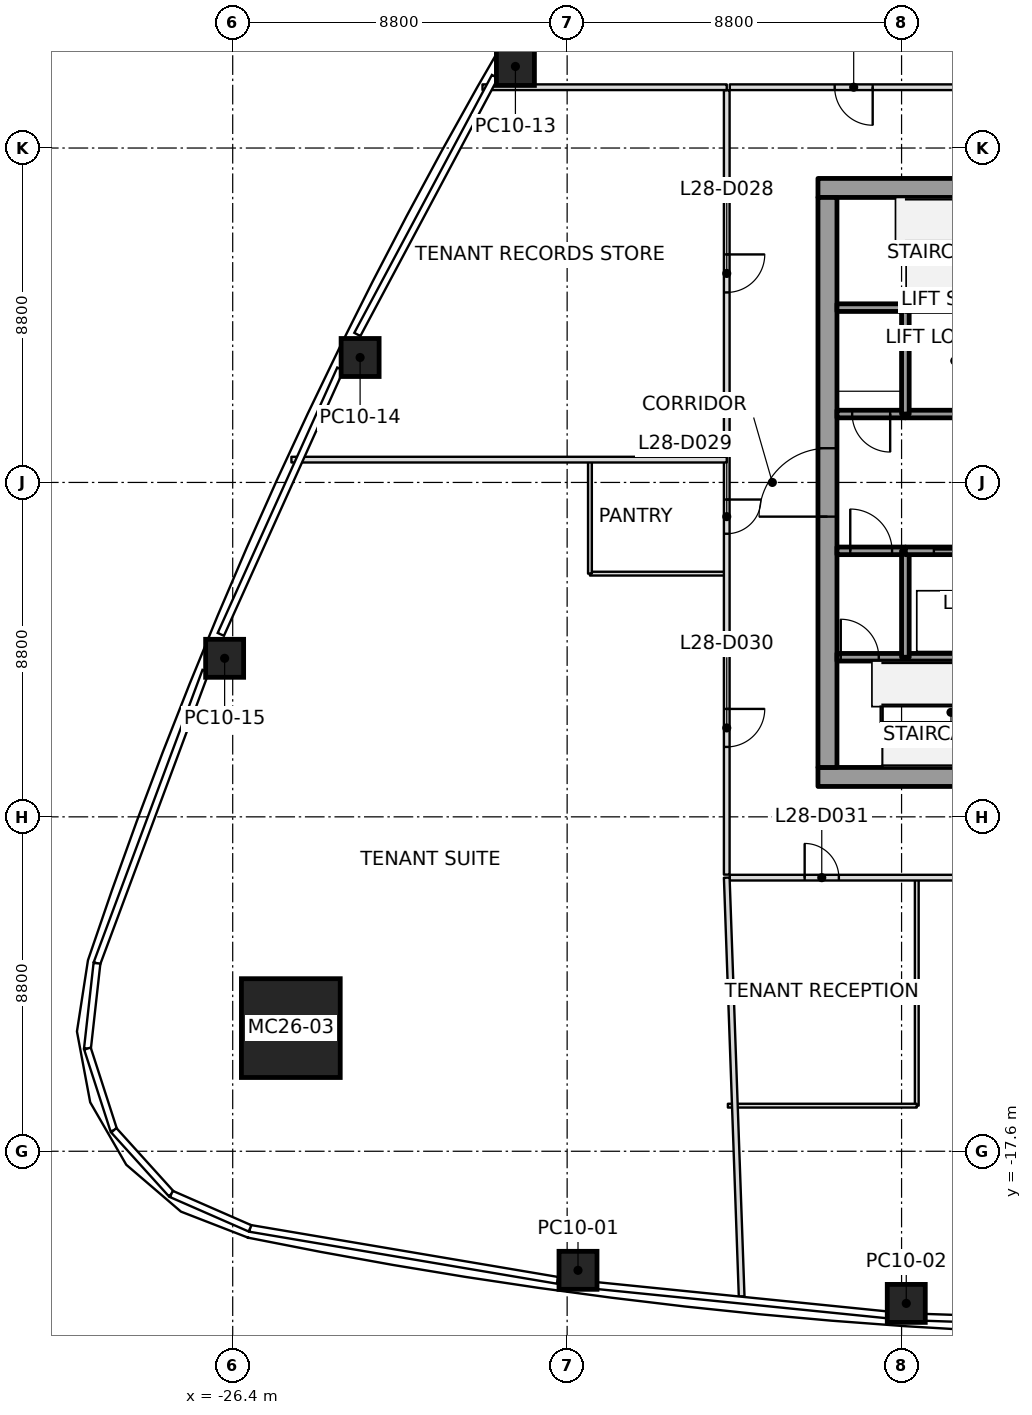
"""IFC4 building model, lengths in metres.
Left out: names, types, materials, properties, quantities, classifications, styles, units other than length and angle.
Written with IfcOpenShell. Run it as: python <this file> out.ifc"""

import sys

from ifc_helpers import new_model, si_unit, direction, frame, frame_2d, origin, origin_2d, place, context, subcontext, project, spatial, rectangle, extrude, element, fill, save


model = new_model("IFC4")
c1 = context("Model", 3, precision=1e-05, world=origin(), true_north=direction((0.0, 1.0)))
c2 = subcontext(c1, "Body", "Model", "MODEL_VIEW")
j1 = project(units=[si_unit("LENGTHUNIT", "METRE"), si_unit("PLANEANGLEUNIT", "RADIAN")], contexts=[c1])
p1 = place(None, origin())
s1 = spatial("IfcSite", under=j1, at=p1, CompositionType="ELEMENT")
p2 = place(p1, origin())
s2 = spatial("IfcBuilding", under=s1, at=p2, CompositionType="ELEMENT")
p3 = place(p2, frame((0.0, 0.0, 133.8)))
s3 = spatial("IfcBuildingStorey", under=s2, at=p3, CompositionType="ELEMENT", Elevation=133.8)
p4 = place(p3, frame((-24.871, -14.359, 0.0), z_axis=(0.028122372328, 0.016226791842, 0.999472772716), x_axis=(0.999604487872, -0.00045651644, -0.02811866672)))
e1 = element("IfcColumn", 1, at=p4, inside=s3, PredefinedType="COLUMN", context=c2, shape_type="SweptSolid", body=[
    extrude(rectangle(XDim=2.6, YDim=2.6, at=origin_2d()), origin(), (0.0, 0.0, 1.0), 4.002),
])
p5 = place(p3, frame((-17.314, -20.733, 0.0), z_axis=(0.017696448434, 0.010495824588, 0.999788314284), x_axis=(-0.990889638844, 0.133706305787, 0.016135285075)))
e2 = element("IfcColumn", 2, at=p5, inside=s3, PredefinedType="COLUMN", context=c2, shape_type="SweptSolid", body=[
    extrude(rectangle(XDim=1.0, YDim=1.0, at=origin_2d()), origin(), (0.0, 0.0, 1.0), 4.001),
])
p6 = place(p3, frame((-8.677, -21.604, 0.0), z_axis=(0.008849193104, 0.011229320904, 0.999897791843), x_axis=(-0.99771962889, 0.067009688007, 0.008077365942)))
e3 = element("IfcColumn", 3, at=p6, inside=s3, PredefinedType="COLUMN", context=c2, shape_type="SweptSolid", body=[
    extrude(rectangle(XDim=1.0, YDim=1.0, at=origin_2d()), origin(), (0.0, 0.0, 1.0), 4.0),
])
p7 = place(p3, frame((-18.961, 10.947, 0.0), z_axis=(0.009887052741, -0.005675900648, 0.999935013058), x_axis=(0.49997556095, 0.866039512773, -2.7732311e-05)))
e4 = element("IfcColumn", 4, at=p7, inside=s3, PredefinedType="COLUMN", context=c2, shape_type="SweptSolid", body=[
    extrude(rectangle(XDim=1.0, YDim=1.0, at=origin_2d()), origin(), (0.0, 0.0, 1.0), 4.0),
])
p8 = place(p3, frame((-23.048, 3.288, 0.0), z_axis=(0.014097689605, 0.002074984617, 0.999898469639), x_axis=(0.440885651206, 0.897526923314, -0.008078643849)))
e5 = element("IfcColumn", 5, at=p8, inside=s3, PredefinedType="COLUMN", context=c2, shape_type="SweptSolid", body=[
    extrude(rectangle(XDim=1.0, YDim=1.0, at=origin_2d()), origin(), (0.0, 0.0, 1.0), 4.0),
])
p9 = place(p3, frame((-26.613, -4.628, 0.0), z_axis=(0.01794052709, 0.010129685364, 0.999787740954), x_axis=(0.379821285392, 0.924918255815, -0.016186760765)))
e6 = element("IfcColumn", 6, at=p9, inside=s3, PredefinedType="COLUMN", context=c2, shape_type="SweptSolid", body=[
    extrude(rectangle(XDim=1.0, YDim=1.0, at=origin_2d()), origin(), (0.0, 0.0, 1.0), 4.001),
])
p10 = place(p3, frame((-11.0, -7.75, 0.0), z_axis=(0.0, 0.0, 1.0), x_axis=(1.0, 0.0, 0.0)))
e7 = element("IfcWall", 7, at=p10, inside=s3, PredefinedType="SHEAR", context=c2, shape_type="SweptSolid", body=[
    extrude(rectangle(XDim=22.0, YDim=0.5, at=frame_2d((11.0, 0.0))), origin(), (0.0, 0.0, 1.0), 4.0),
])
p11 = place(p10, frame((10.45, 0.0, 0.0)))
e8 = element("IfcOpeningElement", 8, at=p11, cuts=e7, PredefinedType="OPENING", context=c2, shape_type="SweptSolid", body=[
    extrude(rectangle(XDim=1.1, YDim=2.1, at=frame_2d((0.55, 1.05))), frame((0.0, 0.25, 0.0), z_axis=(0.0, -1.0, 0.0), x_axis=(1.0, 0.0, 0.0)), (0.0, 0.0, 1.0), 0.5),
])
p12 = place(p3, frame((-11.0, 7.75, 0.0), z_axis=(0.0, 0.0, 1.0), x_axis=(1.0, 0.0, 0.0)))
e9 = element("IfcWall", 9, at=p12, inside=s3, PredefinedType="SHEAR", context=c2, shape_type="SweptSolid", body=[
    extrude(rectangle(XDim=22.0, YDim=0.5, at=frame_2d((11.0, 0.0))), origin(), (0.0, 0.0, 1.0), 4.0),
])
p13 = place(p12, frame((10.45, 0.0, 0.0)))
e10 = element("IfcOpeningElement", 10, at=p13, cuts=e9, PredefinedType="OPENING", context=c2, shape_type="SweptSolid", body=[
    extrude(rectangle(XDim=1.1, YDim=2.1, at=frame_2d((0.55, 1.05))), frame((0.0, 0.25, 0.0), z_axis=(0.0, -1.0, 0.0), x_axis=(1.0, 0.0, 0.0)), (0.0, 0.0, 1.0), 0.5),
])
p14 = place(p3, frame((-10.75, -7.5, 0.0), z_axis=(0.0, 0.0, 1.0), x_axis=(0.0, 1.0, 0.0)))
e11 = element("IfcWall", 11, at=p14, inside=s3, PredefinedType="SHEAR", context=c2, shape_type="SweptSolid", body=[
    extrude(rectangle(XDim=15.0, YDim=0.5, at=frame_2d((7.5, 0.0))), origin(), (0.0, 0.0, 1.0), 4.0),
])
p15 = place(p14, frame((6.6, 0.0, 0.0)))
e12 = element("IfcOpeningElement", 12, at=p15, cuts=e11, PredefinedType="OPENING", context=c2, shape_type="SweptSolid", body=[
    extrude(rectangle(XDim=1.8, YDim=2.1, at=frame_2d((0.9, 1.05))), frame((0.0, 0.25, 0.0), z_axis=(0.0, -1.0, 0.0), x_axis=(1.0, 0.0, 0.0)), (0.0, 0.0, 1.0), 0.5),
])
p16 = place(p3, frame((-10.5, -4.6, 0.0), z_axis=(0.0, 0.0, 1.0), x_axis=(1.0, 0.0, 0.0)))
e13 = element("IfcWall", 13, at=p16, inside=s3, PredefinedType="SOLIDWALL", context=c2, shape_type="SweptSolid", body=[
    extrude(rectangle(XDim=1.8, YDim=0.2, at=frame_2d((0.9, 0.0))), origin(), (0.0, 0.0, 1.0), 3.85),
])
p17 = place(p16, frame((0.1, 0.0, 0.0)))
e14 = element("IfcOpeningElement", 14, at=p17, cuts=e13, PredefinedType="OPENING", context=c2, shape_type="SweptSolid", body=[
    extrude(rectangle(XDim=1.0, YDim=2.1, at=frame_2d((0.5, 1.05))), frame((0.0, 0.1, 0.0), z_axis=(0.0, -1.0, 0.0), x_axis=(1.0, 0.0, 0.0)), (0.0, 0.0, 1.0), 0.2),
])
p18 = place(p3, frame((-10.5, -1.8, 0.0), z_axis=(0.0, 0.0, 1.0), x_axis=(1.0, 0.0, 0.0)))
e15 = element("IfcWall", 15, at=p18, inside=s3, PredefinedType="SOLIDWALL", context=c2, shape_type="SweptSolid", body=[
    extrude(rectangle(XDim=1.8, YDim=0.2, at=frame_2d((0.9, 0.0))), origin(), (0.0, 0.0, 1.0), 3.85),
])
p19 = place(p18, frame((0.35, 0.0, 0.0)))
e16 = element("IfcOpeningElement", 16, at=p19, cuts=e15, PredefinedType="OPENING", context=c2, shape_type="SweptSolid", body=[
    extrude(rectangle(XDim=1.1, YDim=2.1, at=frame_2d((0.55, 1.05))), frame((0.0, 0.1, 0.0), z_axis=(0.0, -1.0, 0.0), x_axis=(1.0, 0.0, 0.0)), (0.0, 0.0, 1.0), 0.2),
])
p20 = place(p3, frame((-8.7, 1.8, 0.0), z_axis=(0.0, 0.0, 1.0), x_axis=(-1.0, 0.0, 0.0)))
e17 = element("IfcWall", 17, at=p20, inside=s3, PredefinedType="SOLIDWALL", context=c2, shape_type="SweptSolid", body=[
    extrude(rectangle(XDim=1.8, YDim=0.2, at=frame_2d((0.9, 0.0))), origin(), (0.0, 0.0, 1.0), 3.85),
])
p21 = place(p20, frame((0.4, 0.0, 0.0)))
e18 = element("IfcOpeningElement", 18, at=p21, cuts=e17, PredefinedType="OPENING", context=c2, shape_type="SweptSolid", body=[
    extrude(rectangle(XDim=1.0, YDim=2.1, at=frame_2d((0.5, 1.05))), frame((0.0, 0.1, 0.0), z_axis=(0.0, -1.0, 0.0), x_axis=(1.0, 0.0, 0.0)), (0.0, 0.0, 1.0), 0.2),
])
p22 = place(p3, frame((-8.7, 4.6, 0.0), z_axis=(0.0, 0.0, 1.0), x_axis=(-1.0, 0.0, 0.0)))
e19 = element("IfcWall", 19, at=p22, inside=s3, PredefinedType="SOLIDWALL", context=c2, shape_type="SweptSolid", body=[
    extrude(rectangle(XDim=1.8, YDim=0.2, at=frame_2d((0.9, 0.0))), origin(), (0.0, 0.0, 1.0), 3.85),
])
p23 = place(p3, frame((-8.7, -4.6, 0.0), z_axis=(0.0, 0.0, 1.0), x_axis=(1.0, 0.0, 0.0)))
e20 = element("IfcWall", 20, at=p23, inside=s3, PredefinedType="SOLIDWALL", context=c2, shape_type="SweptSolid", body=[
    extrude(rectangle(XDim=2.6, YDim=0.2, at=frame_2d((1.3, 0.0))), origin(), (0.0, 0.0, 1.0), 3.85),
])
p24 = place(p3, frame((-8.7, -4.6, 0.0), z_axis=(0.0, 0.0, 1.0), x_axis=(0.0, 1.0, 0.0)))
e21 = element("IfcWall", 21, at=p24, inside=s3, PredefinedType="SOLIDWALL", context=c2, shape_type="SweptSolid", body=[
    extrude(rectangle(XDim=2.8, YDim=0.2, at=frame_2d((1.4, 0.0))), origin(), (0.0, 0.0, 1.0), 3.85),
])
p25 = place(p3, frame((-8.7, -1.8, 0.0), z_axis=(0.0, 0.0, 1.0), x_axis=(1.0, 0.0, 0.0)))
e22 = element("IfcWall", 22, at=p25, inside=s3, PredefinedType="SOLIDWALL", context=c2, shape_type="SweptSolid", body=[
    extrude(rectangle(XDim=2.6, YDim=0.2, at=frame_2d((1.3, 0.0))), origin(), (0.0, 0.0, 1.0), 3.85),
])
p26 = place(p25, frame((0.75, 0.0, 0.0)))
e23 = element("IfcOpeningElement", 23, at=p26, cuts=e22, PredefinedType="OPENING", context=c2, shape_type="SweptSolid", body=[
    extrude(rectangle(XDim=1.1, YDim=2.1, at=frame_2d((0.55, 1.05))), frame((0.0, 0.1, 0.0), z_axis=(0.0, -1.0, 0.0), x_axis=(1.0, 0.0, 0.0)), (0.0, 0.0, 1.0), 0.2),
])
p27 = place(p3, frame((-6.1, 1.8, 0.0), z_axis=(0.0, 0.0, 1.0), x_axis=(-1.0, 0.0, 0.0)))
e24 = element("IfcWall", 24, at=p27, inside=s3, PredefinedType="SOLIDWALL", context=c2, shape_type="SweptSolid", body=[
    extrude(rectangle(XDim=2.6, YDim=0.2, at=frame_2d((1.3, 0.0))), origin(), (0.0, 0.0, 1.0), 3.85),
])
p28 = place(p3, frame((-8.7, 1.8, 0.0), z_axis=(0.0, 0.0, 1.0), x_axis=(0.0, 1.0, 0.0)))
e25 = element("IfcWall", 25, at=p28, inside=s3, PredefinedType="SOLIDWALL", context=c2, shape_type="SweptSolid", body=[
    extrude(rectangle(XDim=2.8, YDim=0.2, at=frame_2d((1.4, 0.0))), origin(), (0.0, 0.0, 1.0), 3.85),
])
p29 = place(p3, frame((-6.1, 4.6, 0.0), z_axis=(0.0, 0.0, 1.0), x_axis=(-1.0, 0.0, 0.0)))
e26 = element("IfcWall", 26, at=p29, inside=s3, PredefinedType="SOLIDWALL", context=c2, shape_type="SweptSolid", body=[
    extrude(rectangle(XDim=2.6, YDim=0.2, at=frame_2d((1.3, 0.0))), origin(), (0.0, 0.0, 1.0), 3.85),
])
p30 = place(p3, frame((-13.4, 0.6, 0.0), z_axis=(0.0, 0.0, 1.0), x_axis=(-1.0, 0.0, 0.0)))
e27 = element("IfcWall", 27, at=p30, inside=s3, PredefinedType="PARTITIONING", context=c2, shape_type="SweptSolid", body=[
    extrude(rectangle(XDim=11.455, YDim=0.15, at=frame_2d((5.728, 0.0))), origin(), (0.0, 0.0, 1.0), 3.234),
])
p31 = place(p3, frame((-13.4, 10.4, 0.0), z_axis=(0.0, 0.0, 1.0), x_axis=(-1.0, 0.0, 0.0)))
e28 = element("IfcWall", 28, at=p31, inside=s3, PredefinedType="PARTITIONING", context=c2, shape_type="SweptSolid", body=[
    extrude(rectangle(XDim=6.427, YDim=0.15, at=frame_2d((3.213, 0.0))), origin(), (0.0, 0.0, 1.0), 3.234),
])
p32 = place(p3, frame((-13.4, -10.4, 0.0), z_axis=(0.0, 0.0, 1.0), x_axis=(0.035539097782, -0.999368286734, 0.0)))
e29 = element("IfcWall", 29, at=p32, inside=s3, PredefinedType="PARTITIONING", context=c2, shape_type="SweptSolid", body=[
    extrude(rectangle(XDim=11.026, YDim=0.15, at=frame_2d((5.513, 0.0))), origin(), (0.0, 0.0, 1.0), 3.234),
])
p33 = place(p3, frame((-13.4, 10.32, 0.0), z_axis=(0.0, 0.0, 1.0), x_axis=(0.0, -1.0, 0.0)))
e30 = element("IfcWall", 30, at=p33, inside=s3, PredefinedType="PARTITIONING", context=c2, shape_type="SweptSolid", body=[
    extrude(rectangle(XDim=20.64, YDim=0.15, at=frame_2d((10.32, 0.0))), origin(), (0.0, 0.0, 1.0), 3.166),
])
p34 = place(p33, frame((4.32, 0.0, 0.0)))
e31 = element("IfcOpeningElement", 31, at=p34, cuts=e30, PredefinedType="OPENING", context=c2, shape_type="SweptSolid", body=[
    extrude(rectangle(XDim=1.0, YDim=2.1, at=frame_2d((0.5, 1.05))), frame((0.0, 0.075, 0.0), z_axis=(0.0, -1.0, 0.0), x_axis=(1.0, 0.0, 0.0)), (0.0, 0.0, 1.0), 0.15),
])
p35 = place(p33, frame((10.77, 0.0, 0.0)))
e32 = element("IfcOpeningElement", 32, at=p35, cuts=e30, PredefinedType="OPENING", context=c2, shape_type="SweptSolid", body=[
    extrude(rectangle(XDim=0.9, YDim=2.1, at=frame_2d((0.45, 1.05))), frame((0.0, 0.075, 0.0), z_axis=(0.0, -1.0, 0.0), x_axis=(1.0, 0.0, 0.0)), (0.0, 0.0, 1.0), 0.15),
])
p36 = place(p33, frame((16.28, 0.0, 0.0)))
e33 = element("IfcOpeningElement", 33, at=p36, cuts=e30, PredefinedType="OPENING", context=c2, shape_type="SweptSolid", body=[
    extrude(rectangle(XDim=1.0, YDim=2.1, at=frame_2d((0.5, 1.05))), frame((0.0, 0.075, 0.0), z_axis=(0.0, -1.0, 0.0), x_axis=(1.0, 0.0, 0.0)), (0.0, 0.0, 1.0), 0.15),
])
p37 = place(p3, frame((-13.32, -10.4, 0.0), z_axis=(0.0, 0.0, 1.0), x_axis=(1.0, 0.0, 0.0)))
e34 = element("IfcWall", 34, at=p37, inside=s3, PredefinedType="PARTITIONING", context=c2, shape_type="SweptSolid", body=[
    extrude(rectangle(XDim=26.64, YDim=0.15, at=frame_2d((13.32, 0.0))), origin(), (0.0, 0.0, 1.0), 3.317),
])
p38 = place(p37, frame((1.97, 0.0, 0.0)))
e35 = element("IfcOpeningElement", 35, at=p38, cuts=e34, PredefinedType="OPENING", context=c2, shape_type="SweptSolid", body=[
    extrude(rectangle(XDim=0.9, YDim=2.1, at=frame_2d((0.45, 1.05))), frame((0.0, 0.075, 0.0), z_axis=(0.0, -1.0, 0.0), x_axis=(1.0, 0.0, 0.0)), (0.0, 0.0, 1.0), 0.15),
])
p39 = place(p37, frame((9.87, 0.0, 0.0)))
e36 = element("IfcOpeningElement", 36, at=p39, cuts=e34, PredefinedType="OPENING", context=c2, shape_type="SweptSolid", body=[
    extrude(rectangle(XDim=1.0, YDim=2.1, at=frame_2d((0.5, 1.05))), frame((0.0, 0.075, 0.0), z_axis=(0.0, -1.0, 0.0), x_axis=(1.0, 0.0, 0.0)), (0.0, 0.0, 1.0), 0.15),
])
p40 = place(p37, frame((20.72, 0.0, 0.0)))
e37 = element("IfcOpeningElement", 37, at=p40, cuts=e34, PredefinedType="OPENING", context=c2, shape_type="SweptSolid", body=[
    extrude(rectangle(XDim=1.0, YDim=2.1, at=frame_2d((0.5, 1.05))), frame((0.0, 0.075, 0.0), z_axis=(0.0, -1.0, 0.0), x_axis=(1.0, 0.0, 0.0)), (0.0, 0.0, 1.0), 0.15),
])
p41 = place(p3, frame((13.32, 10.4, 0.0), z_axis=(0.0, 0.0, 1.0), x_axis=(-1.0, 0.0, 0.0)))
e38 = element("IfcWall", 38, at=p41, inside=s3, PredefinedType="PARTITIONING", context=c2, shape_type="SweptSolid", body=[
    extrude(rectangle(XDim=26.64, YDim=0.15, at=frame_2d((13.32, 0.0))), origin(), (0.0, 0.0, 1.0), 3.166),
])
p42 = place(p41, frame((0.95, 0.0, 0.0)))
e39 = element("IfcOpeningElement", 39, at=p42, cuts=e38, PredefinedType="OPENING", context=c2, shape_type="SweptSolid", body=[
    extrude(rectangle(XDim=0.9, YDim=2.1, at=frame_2d((0.45, 1.05))), frame((0.0, 0.075, 0.0), z_axis=(0.0, -1.0, 0.0), x_axis=(1.0, 0.0, 0.0)), (0.0, 0.0, 1.0), 0.15),
])
p43 = place(p41, frame((8.86, 0.0, 0.0)))
e40 = element("IfcOpeningElement", 40, at=p43, cuts=e38, PredefinedType="OPENING", context=c2, shape_type="SweptSolid", body=[
    extrude(rectangle(XDim=1.0, YDim=2.1, at=frame_2d((0.5, 1.05))), frame((0.0, 0.075, 0.0), z_axis=(0.0, -1.0, 0.0), x_axis=(1.0, 0.0, 0.0)), (0.0, 0.0, 1.0), 0.15),
])
p44 = place(p41, frame((17.37, 0.0, 0.0)))
e41 = element("IfcOpeningElement", 41, at=p44, cuts=e38, PredefinedType="OPENING", context=c2, shape_type="SweptSolid", body=[
    extrude(rectangle(XDim=0.9, YDim=2.1, at=frame_2d((0.45, 1.05))), frame((0.0, 0.075, 0.0), z_axis=(0.0, -1.0, 0.0), x_axis=(1.0, 0.0, 0.0)), (0.0, 0.0, 1.0), 0.15),
])
p45 = place(p41, frame((22.88, 0.0, 0.0)))
e42 = element("IfcOpeningElement", 42, at=p45, cuts=e38, PredefinedType="OPENING", context=c2, shape_type="SweptSolid", body=[
    extrude(rectangle(XDim=1.0, YDim=2.1, at=frame_2d((0.5, 1.05))), frame((0.0, 0.075, 0.0), z_axis=(0.0, -1.0, 0.0), x_axis=(1.0, 0.0, 0.0)), (0.0, 0.0, 1.0), 0.15),
])
p46 = place(p3, frame((-13.43, -2.4, 0.0), z_axis=(0.0, 0.0, 1.0), x_axis=(-1.0, 0.0, 0.0)))
e43 = element("IfcWall", 43, at=p46, inside=s3, PredefinedType="PARTITIONING", context=c2, shape_type="SweptSolid", body=[
    extrude(rectangle(XDim=3.57, YDim=0.1, at=frame_2d((1.785, 0.0))), origin(), (0.0, 0.0, 1.0), 3.45),
])
p47 = place(p3, frame((-17.0, -2.4, 0.0), z_axis=(0.0, 0.0, 1.0), x_axis=(0.0, 1.0, 0.0)))
e44 = element("IfcWall", 44, at=p47, inside=s3, PredefinedType="PARTITIONING", context=c2, shape_type="SweptSolid", body=[
    extrude(rectangle(XDim=2.97, YDim=0.1, at=frame_2d((1.485, 0.0))), origin(), (0.0, 0.0, 1.0), 3.45),
])
p48 = place(p3, frame((-8.4, -10.43, 0.0), z_axis=(0.0, 0.0, 1.0), x_axis=(0.0, -1.0, 0.0)))
e45 = element("IfcWall", 45, at=p48, inside=s3, PredefinedType="PARTITIONING", context=c2, shape_type="SweptSolid", body=[
    extrude(rectangle(XDim=5.97, YDim=0.1, at=frame_2d((2.985, 0.0))), origin(), (0.0, 0.0, 1.0), 3.45),
])
p49 = place(p3, frame((-8.4, -16.4, 0.0), z_axis=(0.0, 0.0, 1.0), x_axis=(-1.0, 0.0, 0.0)))
e46 = element("IfcWall", 46, at=p49, inside=s3, PredefinedType="PARTITIONING", context=c2, shape_type="SweptSolid", body=[
    extrude(rectangle(XDim=4.97, YDim=0.1, at=frame_2d((2.485, 0.0))), origin(), (0.0, 0.0, 1.0), 3.317),
])
p50 = place(p45, origin())
e47 = element("IfcDoor", 47, at=p50, inside=s3, OperationType="SINGLE_SWING_RIGHT", PredefinedType="DOOR", context=c2, shape_type="SweptSolid", body=[
    extrude(rectangle(XDim=1.0, YDim=2.1, at=frame_2d((0.5, 1.05))), frame((0.0, 0.025, 0.0), z_axis=(0.0, -1.0, 0.0), x_axis=(1.0, 0.0, 0.0)), (0.0, 0.0, 1.0), 0.05),
])
fill(e42, e47)
p51 = place(p34, origin())
e48 = element("IfcDoor", 48, at=p51, inside=s3, OperationType="SINGLE_SWING_RIGHT", PredefinedType="DOOR", context=c2, shape_type="SweptSolid", body=[
    extrude(rectangle(XDim=1.0, YDim=2.1, at=frame_2d((0.5, 1.05))), frame((0.0, 0.025, 0.0), z_axis=(0.0, -1.0, 0.0), x_axis=(1.0, 0.0, 0.0)), (0.0, 0.0, 1.0), 0.05),
])
fill(e31, e48)
p52 = place(p35, origin())
e49 = element("IfcDoor", 49, at=p52, inside=s3, OperationType="SINGLE_SWING_LEFT", PredefinedType="DOOR", context=c2, shape_type="SweptSolid", body=[
    extrude(rectangle(XDim=0.9, YDim=2.1, at=frame_2d((0.45, 1.05))), frame((0.0, 0.025, 0.0), z_axis=(0.0, -1.0, 0.0), x_axis=(1.0, 0.0, 0.0)), (0.0, 0.0, 1.0), 0.05),
])
fill(e32, e49)
p53 = place(p36, origin())
e50 = element("IfcDoor", 50, at=p53, inside=s3, OperationType="SINGLE_SWING_RIGHT", PredefinedType="DOOR", context=c2, shape_type="SweptSolid", body=[
    extrude(rectangle(XDim=1.0, YDim=2.1, at=frame_2d((0.5, 1.05))), frame((0.0, 0.025, 0.0), z_axis=(0.0, -1.0, 0.0), x_axis=(1.0, 0.0, 0.0)), (0.0, 0.0, 1.0), 0.05),
])
fill(e33, e50)
p54 = place(p38, origin())
e51 = element("IfcDoor", 51, at=p54, inside=s3, OperationType="SINGLE_SWING_LEFT", PredefinedType="DOOR", context=c2, shape_type="SweptSolid", body=[
    extrude(rectangle(XDim=0.9, YDim=2.1, at=frame_2d((0.45, 1.05))), frame((0.0, 0.025, 0.0), z_axis=(0.0, -1.0, 0.0), x_axis=(1.0, 0.0, 0.0)), (0.0, 0.0, 1.0), 0.05),
])
fill(e35, e51)
p55 = place(p26, origin())
e52 = element("IfcDoor", 52, at=p55, inside=s3, OperationType="SLIDING_TO_RIGHT", PredefinedType="DOOR", context=c2, shape_type="SweptSolid", body=[
    extrude(rectangle(XDim=1.1, YDim=2.1, at=frame_2d((0.55, 1.05))), frame((0.0, 0.025, 0.0), z_axis=(0.0, -1.0, 0.0), x_axis=(1.0, 0.0, 0.0)), (0.0, 0.0, 1.0), 0.05),
])
fill(e23, e52)
p56 = place(p19, origin())
e53 = element("IfcDoor", 53, at=p56, inside=s3, OperationType="SINGLE_SWING_LEFT", PredefinedType="DOOR", context=c2, shape_type="SweptSolid", body=[
    extrude(rectangle(XDim=1.1, YDim=2.1, at=frame_2d((0.55, 1.05))), frame((0.0, 0.025, 0.0), z_axis=(0.0, -1.0, 0.0), x_axis=(1.0, 0.0, 0.0)), (0.0, 0.0, 1.0), 0.05),
])
fill(e16, e53)
p57 = place(p21, origin())
e54 = element("IfcDoor", 54, at=p57, inside=s3, OperationType="SINGLE_SWING_LEFT", PredefinedType="DOOR", context=c2, shape_type="SweptSolid", body=[
    extrude(rectangle(XDim=1.0, YDim=2.1, at=frame_2d((0.5, 1.05))), frame((0.0, 0.025, 0.0), z_axis=(0.0, -1.0, 0.0), x_axis=(1.0, 0.0, 0.0)), (0.0, 0.0, 1.0), 0.05),
])
fill(e18, e54)
p58 = place(p17, origin())
e55 = element("IfcDoor", 55, at=p58, inside=s3, OperationType="SINGLE_SWING_LEFT", PredefinedType="DOOR", context=c2, shape_type="SweptSolid", body=[
    extrude(rectangle(XDim=1.0, YDim=2.1, at=frame_2d((0.5, 1.05))), frame((0.0, 0.025, 0.0), z_axis=(0.0, -1.0, 0.0), x_axis=(1.0, 0.0, 0.0)), (0.0, 0.0, 1.0), 0.05),
])
fill(e14, e55)
p59 = place(p15, origin())
e56 = element("IfcDoor", 56, at=p59, inside=s3, OperationType="DOUBLE_DOOR_SINGLE_SWING", PredefinedType="DOOR", context=c2, shape_type="SweptSolid", body=[
    extrude(rectangle(XDim=1.8, YDim=2.1, at=frame_2d((0.9, 1.05))), frame((0.0, 0.025, 0.0), z_axis=(0.0, -1.0, 0.0), x_axis=(1.0, 0.0, 0.0)), (0.0, 0.0, 1.0), 0.05),
])
fill(e12, e56)
save(model, sys.argv[1])
